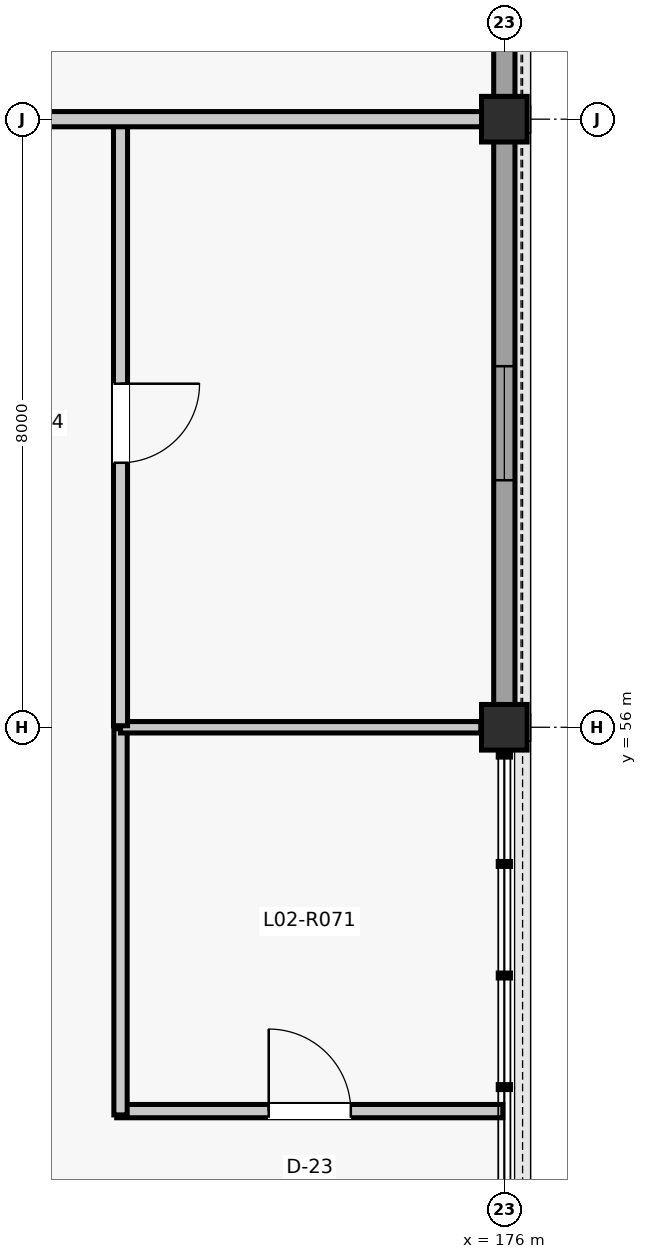
"""IFC4 building model, lengths in metres.
Left out: names, types, materials, properties, quantities, classifications, styles, units other than length and angle.
Written with IfcOpenShell. Run it as: python <this file> out.ifc"""

import sys

from ifc_helpers import new_model, si_unit, direction, frame, frame_2d, origin, origin_2d, place, context, subcontext, project, spatial, rectangle, extrude, element, fill, save


model = new_model("IFC4")
c1 = context("Model", 3, precision=1e-05, world=origin(), true_north=direction((0.0, 1.0)))
c2 = subcontext(c1, "Body", "Model", "MODEL_VIEW")
j1 = project(units=[si_unit("LENGTHUNIT", "METRE"), si_unit("PLANEANGLEUNIT", "RADIAN")], contexts=[c1])
p1 = place(None, origin())
s1 = spatial("IfcSite", under=j1, at=p1, CompositionType="ELEMENT")
p2 = place(p1, origin())
s2 = spatial("IfcBuilding", under=s1, at=p2, CompositionType="ELEMENT")
p3 = place(p2, frame((0.0, 0.0, 9.9)))
s3 = spatial("IfcBuildingStorey", under=s2, at=p3, CompositionType="ELEMENT", Elevation=9.9)
for number, where, z_axis, x_axis in (
    (1, (176.0, 56.0, 0.0), (0.0, 0.0, 1.0), (1.0, 0.0, 0.0)),
    (2, (176.0, 64.0, 0.0), (0.0, 0.0, 1.0), (1.0, 0.0, 0.0)),
):
    element("IfcColumn", number, at=place(p3, frame(where, z_axis=z_axis, x_axis=x_axis)), inside=s3, PredefinedType="COLUMN", context=c2, shape_type="SweptSolid", body=[
        extrude(rectangle(XDim=0.6, YDim=0.6, at=origin_2d()), origin(), (0.0, 0.0, 1.0), 3.96),
    ])
p4 = place(p3, frame((176.0, 56.285, 0.0), z_axis=(0.0, 0.0, 1.0), x_axis=(0.0, 1.0, 0.0)))
e3 = element("IfcWall", 3, at=p4, inside=s3, PredefinedType="SOLIDWALL", context=c2, shape_type="SweptSolid", body=[
    extrude(rectangle(XDim=7.43, YDim=0.28, at=frame_2d((3.715, 0.0))), origin(), (0.0, 0.0, 1.0), 3.347),
])
p5 = place(p4, frame((2.965, 0.0, 0.9)))
e4 = element("IfcOpeningElement", 4, at=p5, cuts=e3, PredefinedType="OPENING", context=c2, shape_type="SweptSolid", body=[
    extrude(rectangle(XDim=1.5, YDim=1.9, at=frame_2d((0.75, 0.95))), frame((0.0, 0.15, 0.0), z_axis=(0.0, -1.0, 0.0), x_axis=(1.0, 0.0, 0.0)), (0.0, 0.0, 1.0), 0.3),
])
p6 = place(p3, frame((176.0, 64.285, 0.0), z_axis=(0.0, 0.0, 1.0), x_axis=(0.0, 1.0, 0.0)))
e5 = element("IfcWall", 5, at=p6, inside=s3, PredefinedType="SOLIDWALL", context=c2, shape_type="SweptSolid", body=[
    extrude(rectangle(XDim=7.43, YDim=0.28, at=frame_2d((3.715, 0.0))), origin(), (0.0, 0.0, 1.0), 3.28),
])
p7 = place(p6, frame((3.04, 0.0, 0.9)))
e6 = element("IfcOpeningElement", 6, at=p7, cuts=e5, PredefinedType="OPENING", context=c2, shape_type="SweptSolid", body=[
    extrude(rectangle(XDim=1.35, YDim=1.9, at=frame_2d((0.675, 0.95))), frame((0.0, 0.15, 0.0), z_axis=(0.0, -1.0, 0.0), x_axis=(1.0, 0.0, 0.0)), (0.0, 0.0, 1.0), 0.3),
])
p8 = place(p3, frame((170.9, 50.95, 0.0), z_axis=(0.0, 0.0, 1.0), x_axis=(1.0, 0.0, 0.0)))
e7 = element("IfcWall", 7, at=p8, inside=s3, PredefinedType="PARTITIONING", context=c2, shape_type="SweptSolid", body=[
    extrude(rectangle(XDim=5.08, YDim=0.175, at=frame_2d((2.54, 0.0))), origin(), (0.0, 0.0, 1.0), 3.277),
])
p9 = place(p8, frame((2.0, 0.0, 0.0)))
e8 = element("IfcOpeningElement", 8, at=p9, cuts=e7, PredefinedType="OPENING", context=c2, shape_type="SweptSolid", body=[
    extrude(rectangle(XDim=1.08, YDim=2.2, at=frame_2d((0.54, 1.1))), frame((0.0, 0.097, 0.0), z_axis=(0.0, -1.0, 0.0), x_axis=(1.0, 0.0, 0.0)), (0.0, 0.0, 1.0), 0.195),
])
p10 = place(p3, frame((170.95, 50.9, 0.0), z_axis=(0.0, 0.0, 1.0), x_axis=(0.0, 1.0, 0.0)))
e9 = element("IfcWall", 9, at=p10, inside=s3, PredefinedType="PARTITIONING", context=c2, shape_type="SweptSolid", body=[
    extrude(rectangle(XDim=5.08, YDim=0.175, at=frame_2d((2.54, 0.0))), origin(), (0.0, 0.0, 1.0), 3.082),
])
p11 = place(p3, frame((170.95, 56.0, 0.0), z_axis=(0.0, 0.0, 1.0), x_axis=(1.0, 0.0, 0.0)))
e10 = element("IfcWall", 10, at=p11, inside=s3, PredefinedType="PARTITIONING", context=c2, shape_type="SweptSolid", body=[
    extrude(rectangle(XDim=4.74, YDim=0.15, at=frame_2d((2.37, 0.0))), origin(), (0.0, 0.0, 1.0), 3.082),
])
p12 = place(p3, frame((170.95, 56.02, 0.0), z_axis=(0.0, 0.0, 1.0), x_axis=(0.0, 1.0, 0.0)))
e11 = element("IfcWall", 11, at=p12, inside=s3, PredefinedType="PARTITIONING", context=c2, shape_type="SweptSolid", body=[
    extrude(rectangle(XDim=7.96, YDim=0.185, at=frame_2d((3.98, 0.0))), origin(), (0.0, 0.0, 1.0), 3.082),
])
p13 = place(p12, frame((3.46, 0.0, 0.0)))
e12 = element("IfcOpeningElement", 12, at=p13, cuts=e11, PredefinedType="OPENING", context=c2, shape_type="SweptSolid", body=[
    extrude(rectangle(XDim=1.04, YDim=2.18, at=frame_2d((0.52, 1.09))), frame((0.0, 0.103, 0.0), z_axis=(0.0, -1.0, 0.0), x_axis=(1.0, 0.0, 0.0)), (0.0, 0.0, 1.0), 0.205),
])
p14 = place(p3, frame((168.29, 64.0, 0.0), z_axis=(0.0, 0.0, 1.0), x_axis=(1.0, 0.0, 0.0)))
e13 = element("IfcWall", 13, at=p14, inside=s3, PredefinedType="PARTITIONING", context=c2, shape_type="SweptSolid", body=[
    extrude(rectangle(XDim=7.42, YDim=0.2, at=frame_2d((3.71, 0.0))), origin(), (0.0, 0.0, 1.0), 3.157),
])
p15 = place(p14, frame((0.52, 0.0, 0.0)))
e14 = element("IfcOpeningElement", 14, at=p15, cuts=e13, PredefinedType="OPENING", context=c2, shape_type="SweptSolid", body=[
    extrude(rectangle(XDim=0.94, YDim=2.12, at=frame_2d((0.47, 1.06))), frame((0.0, 0.11, 0.0), z_axis=(0.0, -1.0, 0.0), x_axis=(1.0, 0.0, 0.0)), (0.0, 0.0, 1.0), 0.22),
])
p16 = place(p5, origin())
e15 = element("IfcWindow", 15, at=p16, inside=s3, PartitioningType="SINGLE_PANEL", PredefinedType="WINDOW", context=c2, shape_type="SweptSolid", body=[
    extrude(rectangle(XDim=1.5, YDim=1.9, at=frame_2d((0.75, 0.95))), frame((0.0, 0.03, 0.0), z_axis=(0.0, -1.0, 0.0), x_axis=(1.0, 0.0, 0.0)), (0.0, 0.0, 1.0), 0.06),
])
fill(e4, e15)
p17 = place(p9, origin())
e16 = element("IfcDoor", 16, at=p17, inside=s3, OperationType="SINGLE_SWING_LEFT", PredefinedType="DOOR", context=c2, shape_type="SweptSolid", body=[
    extrude(rectangle(XDim=1.08, YDim=2.2, at=frame_2d((0.54, 1.1))), frame((0.0, 0.025, 0.0), z_axis=(0.0, -1.0, 0.0), x_axis=(1.0, 0.0, 0.0)), (0.0, 0.0, 1.0), 0.05),
])
fill(e8, e16)
p18 = place(p13, frame((1.04, 0.0, 0.0), z_axis=(0.0, 0.0, 1.0), x_axis=(-1.0, 0.0, 0.0)))
e17 = element("IfcDoor", 17, at=p18, inside=s3, OperationType="SINGLE_SWING_RIGHT", PredefinedType="DOOR", context=c2, shape_type="SweptSolid", body=[
    extrude(rectangle(XDim=1.04, YDim=2.18, at=frame_2d((0.52, 1.09))), frame((0.0, 0.025, 0.0), z_axis=(0.0, -1.0, 0.0), x_axis=(1.0, 0.0, 0.0)), (0.0, 0.0, 1.0), 0.05),
])
fill(e12, e17)
save(model, sys.argv[1])
